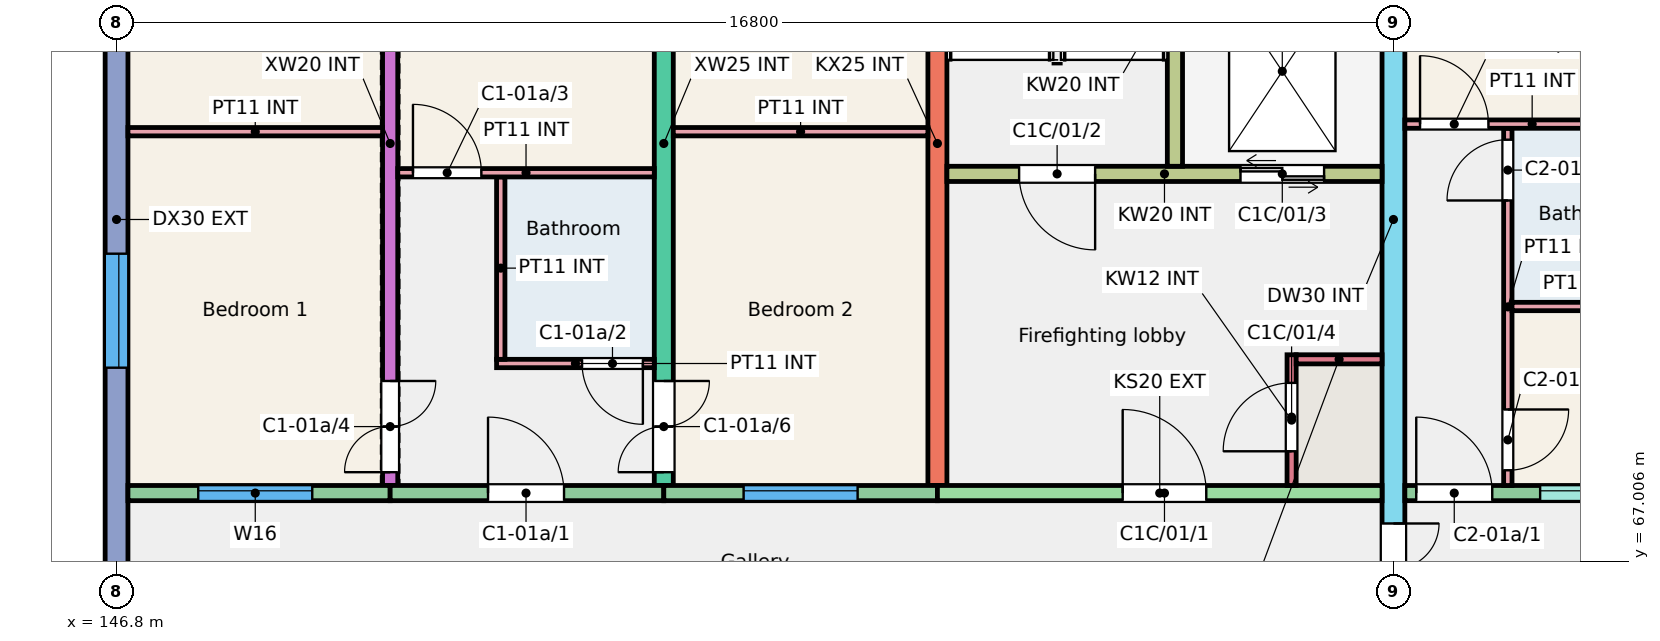
"""IFC4 building model, lengths in metres.
Left out: names, types, materials, properties, quantities, classifications, styles, units other than length and angle.
Written with IfcOpenShell. Run it as: python <this file> out.ifc"""

import sys

from ifc_helpers import new_model, si_unit, direction, frame, frame_2d, origin, place, context, subcontext, project, spatial, rectangle, extrude, element, fill, save


model = new_model("IFC4")
c1 = context("Model", 3, precision=1e-05, world=origin(), true_north=direction((0.0, 1.0)))
c2 = subcontext(c1, "Body", "Model", "MODEL_VIEW")
j1 = project(units=[si_unit("LENGTHUNIT", "METRE"), si_unit("PLANEANGLEUNIT", "RADIAN")], contexts=[c1])
p1 = place(None, origin())
s1 = spatial("IfcSite", under=j1, at=p1, CompositionType="ELEMENT")
p2 = place(p1, origin())
s2 = spatial("IfcBuilding", under=s1, at=p2, CompositionType="ELEMENT")
p3 = place(p2, frame((0.0, 0.0, 3.0)))
s3 = spatial("IfcBuildingStorey", under=s2, at=p3, CompositionType="ELEMENT", Elevation=3.0)
p4 = place(p3, frame((146.8, 66.0, 0.0), z_axis=(0.0, 0.0, 1.0), x_axis=(0.0, 1.0, 0.0)))
e1 = element("IfcWall", 1, at=p4, inside=s3, PredefinedType="SHEAR", context=c2, shape_type="SweptSolid", body=[
    extrude(rectangle(XDim=11.0, YDim=0.3, at=frame_2d((5.5, 0.0))), origin(), (0.0, 0.0, 1.0), 3.0),
])
p5 = place(p4, frame((3.55, 0.0, 0.9)))
e2 = element("IfcOpeningElement", 2, at=p5, cuts=e1, PredefinedType="OPENING", context=c2, shape_type="SweptSolid", body=[
    extrude(rectangle(XDim=1.5, YDim=1.5, at=frame_2d((0.75, 0.75))), frame((0.0, 0.16, 0.0), z_axis=(0.0, -1.0, 0.0), x_axis=(1.0, 0.0, 0.0)), (0.0, 0.0, 1.0), 0.32),
])
p6 = place(p4, frame((8.105, 0.0, 0.9)))
e3 = element("IfcOpeningElement", 3, at=p6, cuts=e1, PredefinedType="OPENING", context=c2, shape_type="SweptSolid", body=[
    extrude(rectangle(XDim=1.5, YDim=1.5, at=frame_2d((0.75, 0.75))), frame((0.0, 0.16, 0.0), z_axis=(0.0, -1.0, 0.0), x_axis=(1.0, 0.0, 0.0)), (0.0, 0.0, 1.0), 0.32),
])
p7 = place(p3, frame((150.4, 68.0, 0.0), z_axis=(0.0, 0.0, 1.0), x_axis=(0.0, 1.0, 0.0)))
e4 = element("IfcWall", 4, at=p7, inside=s3, PredefinedType="SHEAR", context=c2, shape_type="SweptSolid", body=[
    extrude(rectangle(XDim=9.0, YDim=0.2, at=frame_2d((4.5, 0.0))), origin(), (0.0, 0.0, 1.0), 3.0),
])
p8 = place(p7, frame((0.175, 0.0, 0.0)))
e5 = element("IfcOpeningElement", 5, at=p8, cuts=e4, PredefinedType="OPENING", context=c2, shape_type="SweptSolid", body=[
    extrude(rectangle(XDim=1.2, YDim=2.1, at=frame_2d((0.6, 1.05))), frame((0.0, 0.11, 0.0), z_axis=(0.0, -1.0, 0.0), x_axis=(1.0, 0.0, 0.0)), (0.0, 0.0, 1.0), 0.22),
])
p9 = place(p7, frame((6.4, 0.0, 0.0)))
e6 = element("IfcOpeningElement", 6, at=p9, cuts=e4, PredefinedType="OPENING", context=c2, shape_type="SweptSolid", body=[
    extrude(rectangle(XDim=1.2, YDim=2.1, at=frame_2d((0.6, 1.05))), frame((0.0, 0.11, 0.0), z_axis=(0.0, -1.0, 0.0), x_axis=(1.0, 0.0, 0.0)), (0.0, 0.0, 1.0), 0.22),
])
p10 = place(p3, frame((154.0, 68.0, 0.0), z_axis=(0.0, 0.0, 1.0), x_axis=(0.0, 1.0, 0.0)))
e7 = element("IfcWall", 7, at=p10, inside=s3, PredefinedType="SHEAR", context=c2, shape_type="SweptSolid", body=[
    extrude(rectangle(XDim=9.0, YDim=0.25, at=frame_2d((4.5, 0.0))), origin(), (0.0, 0.0, 1.0), 3.0),
])
p11 = place(p10, frame((0.175, 0.0, 0.0)))
e8 = element("IfcOpeningElement", 8, at=p11, cuts=e7, PredefinedType="OPENING", context=c2, shape_type="SweptSolid", body=[
    extrude(rectangle(XDim=1.2, YDim=2.1, at=frame_2d((0.6, 1.05))), frame((0.0, 0.135, 0.0), z_axis=(0.0, -1.0, 0.0), x_axis=(1.0, 0.0, 0.0)), (0.0, 0.0, 1.0), 0.27),
])
p12 = place(p10, frame((6.4, 0.0, 0.0)))
e9 = element("IfcOpeningElement", 9, at=p12, cuts=e7, PredefinedType="OPENING", context=c2, shape_type="SweptSolid", body=[
    extrude(rectangle(XDim=1.2, YDim=2.1, at=frame_2d((0.6, 1.05))), frame((0.0, 0.135, 0.0), z_axis=(0.0, -1.0, 0.0), x_axis=(1.0, 0.0, 0.0)), (0.0, 0.0, 1.0), 0.27),
])
p13 = place(p3, frame((157.6, 68.0, 0.0), z_axis=(0.0, 0.0, 1.0), x_axis=(0.0, 1.0, 0.0)))
e10 = element("IfcWall", 10, at=p13, inside=s3, PredefinedType="SHEAR", context=c2, shape_type="SweptSolid", body=[
    extrude(rectangle(XDim=9.0, YDim=0.25, at=frame_2d((4.5, 0.0))), origin(), (0.0, 0.0, 1.0), 3.0),
])
p14 = place(p3, frame((163.6, 66.0, 0.0), z_axis=(0.0, 0.0, 1.0), x_axis=(0.0, 1.0, 0.0)))
e11 = element("IfcWall", 11, at=p14, inside=s3, PredefinedType="SHEAR", context=c2, shape_type="SweptSolid", body=[
    extrude(rectangle(XDim=11.0, YDim=0.3, at=frame_2d((5.5, 0.0))), origin(), (0.0, 0.0, 1.0), 3.0),
])
p15 = place(p14, frame((0.3, 0.0, 0.0)))
e12 = element("IfcOpeningElement", 12, at=p15, cuts=e11, PredefinedType="OPENING", context=c2, shape_type="SweptSolid", body=[
    extrude(rectangle(XDim=1.2, YDim=2.1, at=frame_2d((0.6, 1.05))), frame((0.0, 0.16, 0.0), z_axis=(0.0, -1.0, 0.0), x_axis=(1.0, 0.0, 0.0)), (0.0, 0.0, 1.0), 0.32),
])
p16 = place(p3, frame((146.95, 67.9, 0.0), z_axis=(0.0, 0.0, 1.0), x_axis=(1.0, 0.0, 0.0)))
e13 = element("IfcWall", 13, at=p16, inside=s3, PredefinedType="SOLIDWALL", context=c2, shape_type="SweptSolid", body=[
    extrude(rectangle(XDim=3.45, YDim=0.2, at=frame_2d((1.725, 0.0))), origin(), (0.0, 0.0, 1.0), 3.0),
])
p17 = place(p16, frame((0.925, 0.0, 0.9)))
e14 = element("IfcOpeningElement", 14, at=p17, cuts=e13, PredefinedType="OPENING", context=c2, shape_type="SweptSolid", body=[
    extrude(rectangle(XDim=1.5, YDim=1.5, at=frame_2d((0.75, 0.75))), frame((0.0, 0.11, 0.0), z_axis=(0.0, -1.0, 0.0), x_axis=(1.0, 0.0, 0.0)), (0.0, 0.0, 1.0), 0.22),
])
p18 = place(p3, frame((150.4, 67.9, 0.0), z_axis=(0.0, 0.0, 1.0), x_axis=(1.0, 0.0, 0.0)))
e15 = element("IfcWall", 15, at=p18, inside=s3, PredefinedType="SOLIDWALL", context=c2, shape_type="SweptSolid", body=[
    extrude(rectangle(XDim=3.6, YDim=0.2, at=frame_2d((1.8, 0.0))), origin(), (0.0, 0.0, 1.0), 3.0),
])
p19 = place(p18, frame((1.288, 0.0, 0.0)))
e16 = element("IfcOpeningElement", 16, at=p19, cuts=e15, PredefinedType="OPENING", context=c2, shape_type="SweptSolid", body=[
    extrude(rectangle(XDim=1.0, YDim=2.1, at=frame_2d((0.5, 1.05))), frame((0.0, 0.11, 0.0), z_axis=(0.0, -1.0, 0.0), x_axis=(1.0, 0.0, 0.0)), (0.0, 0.0, 1.0), 0.22),
])
p20 = place(p3, frame((154.0, 67.9, 0.0), z_axis=(0.0, 0.0, 1.0), x_axis=(1.0, 0.0, 0.0)))
e17 = element("IfcWall", 17, at=p20, inside=s3, PredefinedType="SOLIDWALL", context=c2, shape_type="SweptSolid", body=[
    extrude(rectangle(XDim=3.6, YDim=0.2, at=frame_2d((1.8, 0.0))), origin(), (0.0, 0.0, 1.0), 3.0),
])
p21 = place(p20, frame((1.05, 0.0, 0.9)))
e18 = element("IfcOpeningElement", 18, at=p21, cuts=e17, PredefinedType="OPENING", context=c2, shape_type="SweptSolid", body=[
    extrude(rectangle(XDim=1.5, YDim=1.5, at=frame_2d((0.75, 0.75))), frame((0.0, 0.11, 0.0), z_axis=(0.0, -1.0, 0.0), x_axis=(1.0, 0.0, 0.0)), (0.0, 0.0, 1.0), 0.22),
])
p22 = place(p3, frame((157.6, 67.9, 0.0), z_axis=(0.0, 0.0, 1.0), x_axis=(1.0, 0.0, 0.0)))
e19 = element("IfcWall", 19, at=p22, inside=s3, PredefinedType="SHEAR", context=c2, shape_type="SweptSolid", body=[
    extrude(rectangle(XDim=5.85, YDim=0.2, at=frame_2d((2.925, 0.0))), origin(), (0.0, 0.0, 1.0), 3.0),
])
p23 = place(p22, frame((2.438, 0.0, 0.0)))
e20 = element("IfcOpeningElement", 20, at=p23, cuts=e19, PredefinedType="OPENING", context=c2, shape_type="SweptSolid", body=[
    extrude(rectangle(XDim=1.1, YDim=2.1, at=frame_2d((0.55, 1.05))), frame((0.0, 0.11, 0.0), z_axis=(0.0, -1.0, 0.0), x_axis=(1.0, 0.0, 0.0)), (0.0, 0.0, 1.0), 0.22),
])
p24 = place(p3, frame((157.725, 72.1, 0.0), z_axis=(0.0, 0.0, 1.0), x_axis=(1.0, 0.0, 0.0)))
e21 = element("IfcWall", 21, at=p24, inside=s3, PredefinedType="SHEAR", context=c2, shape_type="SweptSolid", body=[
    extrude(rectangle(XDim=5.725, YDim=0.2, at=frame_2d((2.862, 0.0))), origin(), (0.0, 0.0, 1.0), 3.0),
])
p25 = place(p24, frame((0.95, 0.0, 0.0)))
e22 = element("IfcOpeningElement", 22, at=p25, cuts=e21, PredefinedType="OPENING", context=c2, shape_type="SweptSolid", body=[
    extrude(rectangle(XDim=1.0, YDim=2.1, at=frame_2d((0.5, 1.05))), frame((0.0, 0.11, 0.0), z_axis=(0.0, -1.0, 0.0), x_axis=(1.0, 0.0, 0.0)), (0.0, 0.0, 1.0), 0.22),
])
p26 = place(p24, frame((3.863, 0.0, 0.0)))
e23 = element("IfcOpeningElement", 23, at=p26, cuts=e21, PredefinedType="OPENING", context=c2, shape_type="SweptSolid", body=[
    extrude(rectangle(XDim=1.1, YDim=2.1, at=frame_2d((0.55, 1.05))), frame((0.0, 0.11, 0.0), z_axis=(0.0, -1.0, 0.0), x_axis=(1.0, 0.0, 0.0)), (0.0, 0.0, 1.0), 0.22),
])
p27 = place(p3, frame((160.725, 72.2, 0.0), z_axis=(0.0, 0.0, 1.0), x_axis=(0.0, 1.0, 0.0)))
e24 = element("IfcWall", 24, at=p27, inside=s3, PredefinedType="SHEAR", context=c2, shape_type="SweptSolid", body=[
    extrude(rectangle(XDim=4.8, YDim=0.2, at=frame_2d((2.4, 0.0))), origin(), (0.0, 0.0, 1.0), 3.0),
])
p28 = place(p3, frame((162.26, 68.0, 0.0), z_axis=(0.0, 0.0, 1.0), x_axis=(0.0, 1.0, 0.0)))
e25 = element("IfcWall", 25, at=p28, inside=s3, PredefinedType="SHEAR", context=c2, shape_type="SweptSolid", body=[
    extrude(rectangle(XDim=1.72, YDim=0.12, at=frame_2d((0.86, 0.0))), origin(), (0.0, 0.0, 1.0), 3.0),
])
p29 = place(p28, frame((0.45, 0.0, 0.0)))
e26 = element("IfcOpeningElement", 26, at=p29, cuts=e25, PredefinedType="OPENING", context=c2, shape_type="SweptSolid", body=[
    extrude(rectangle(XDim=0.9, YDim=2.1, at=frame_2d((0.45, 1.05))), frame((0.0, 0.07, 0.0), z_axis=(0.0, -1.0, 0.0), x_axis=(1.0, 0.0, 0.0)), (0.0, 0.0, 1.0), 0.14),
])
p30 = place(p3, frame((162.32, 69.66, 0.0), z_axis=(0.0, 0.0, 1.0), x_axis=(1.0, 0.0, 0.0)))
e27 = element("IfcWall", 27, at=p30, inside=s3, PredefinedType="SHEAR", context=c2, shape_type="SweptSolid", body=[
    extrude(rectangle(XDim=1.13, YDim=0.12, at=frame_2d((0.565, 0.0))), origin(), (0.0, 0.0, 1.0), 3.0),
])
p31 = place(p3, frame((163.75, 67.9, 0.0), z_axis=(0.0, 0.0, 1.0), x_axis=(1.0, 0.0, 0.0)))
e28 = element("IfcWall", 28, at=p31, inside=s3, PredefinedType="SOLIDWALL", context=c2, shape_type="SweptSolid", body=[
    extrude(rectangle(XDim=3.45, YDim=0.2, at=frame_2d((1.725, 0.0))), origin(), (0.0, 0.0, 1.0), 3.0),
])
p32 = place(p31, frame((1.78, 0.0, 1.1)))
e29 = element("IfcOpeningElement", 29, at=p32, cuts=e28, PredefinedType="OPENING", context=c2, shape_type="SweptSolid", body=[
    extrude(rectangle(XDim=1.2, YDim=1.3, at=frame_2d((0.6, 0.65))), frame((0.0, 0.11, 0.0), z_axis=(0.0, -1.0, 0.0), x_axis=(1.0, 0.0, 0.0)), (0.0, 0.0, 1.0), 0.22),
])
p33 = place(p31, frame((0.15, 0.0, 0.0)))
e30 = element("IfcOpeningElement", 30, at=p33, cuts=e28, PredefinedType="OPENING", context=c2, shape_type="SweptSolid", body=[
    extrude(rectangle(XDim=1.0, YDim=2.1, at=frame_2d((0.5, 1.05))), frame((0.0, 0.11, 0.0), z_axis=(0.0, -1.0, 0.0), x_axis=(1.0, 0.0, 0.0)), (0.0, 0.0, 1.0), 0.22),
])
p34 = place(p3, frame((151.8, 69.605, 0.0), z_axis=(0.0, 0.0, 1.0), x_axis=(1.0, 0.0, 0.0)))
e31 = element("IfcWall", 31, at=p34, inside=s3, PredefinedType="PARTITIONING", context=c2, shape_type="SweptSolid", body=[
    extrude(rectangle(XDim=2.075, YDim=0.11, at=frame_2d((1.038, 0.0))), origin(), (0.0, 0.0, 1.0), 2.8),
])
p35 = place(p34, frame((1.125, 0.0, 0.0)))
e32 = element("IfcOpeningElement", 32, at=p35, cuts=e31, PredefinedType="OPENING", context=c2, shape_type="SweptSolid", body=[
    extrude(rectangle(XDim=0.8, YDim=2.1, at=frame_2d((0.4, 1.05))), frame((0.0, 0.065, 0.0), z_axis=(0.0, -1.0, 0.0), x_axis=(1.0, 0.0, 0.0)), (0.0, 0.0, 1.0), 0.13),
])
p36 = place(p3, frame((151.855, 69.66, 0.0), z_axis=(0.0, 0.0, 1.0), x_axis=(0.0, 1.0, 0.0)))
e33 = element("IfcWall", 33, at=p36, inside=s3, PredefinedType="PARTITIONING", context=c2, shape_type="SweptSolid", body=[
    extrude(rectangle(XDim=2.4, YDim=0.11, at=frame_2d((1.2, 0.0))), origin(), (0.0, 0.0, 1.0), 2.8),
])
p37 = place(p3, frame((150.5, 72.115, 0.0), z_axis=(0.0, 0.0, 1.0), x_axis=(1.0, 0.0, 0.0)))
e34 = element("IfcWall", 34, at=p37, inside=s3, PredefinedType="PARTITIONING", context=c2, shape_type="SweptSolid", body=[
    extrude(rectangle(XDim=3.375, YDim=0.11, at=frame_2d((1.688, 0.0))), origin(), (0.0, 0.0, 1.0), 2.8),
])
p38 = place(p37, frame((0.2, 0.0, 0.0)))
e35 = element("IfcOpeningElement", 35, at=p38, cuts=e34, PredefinedType="OPENING", context=c2, shape_type="SweptSolid", body=[
    extrude(rectangle(XDim=0.9, YDim=2.1, at=frame_2d((0.45, 1.05))), frame((0.0, 0.065, 0.0), z_axis=(0.0, -1.0, 0.0), x_axis=(1.0, 0.0, 0.0)), (0.0, 0.0, 1.0), 0.13),
])
for number, where, z_axis, x_axis in (
    (36, (146.95, 72.655, 0.0), (0.0, 0.0, 1.0), (1.0, 0.0, 0.0)),
    (37, (154.125, 72.655, 0.0), (0.0, 0.0, 1.0), (1.0, 0.0, 0.0)),
):
    element("IfcWall", number, at=place(p3, frame(where, z_axis=z_axis, x_axis=x_axis)), inside=s3, PredefinedType="PARTITIONING", context=c2, shape_type="SweptSolid", body=[
        extrude(rectangle(XDim=3.35, YDim=0.11, at=frame_2d((1.675, 0.0))), origin(), (0.0, 0.0, 1.0), 2.8),
    ])
p39 = place(p3, frame((165.105, 68.0, 0.0), z_axis=(0.0, 0.0, 1.0), x_axis=(0.0, 1.0, 0.0)))
e38 = element("IfcWall", 38, at=p39, inside=s3, PredefinedType="PARTITIONING", context=c2, shape_type="SweptSolid", body=[
    extrude(rectangle(XDim=4.7, YDim=0.11, at=frame_2d((2.35, 0.0))), origin(), (0.0, 0.0, 1.0), 2.8),
])
p40 = place(p39, frame((0.2, 0.0, 0.0)))
e39 = element("IfcOpeningElement", 39, at=p40, cuts=e38, PredefinedType="OPENING", context=c2, shape_type="SweptSolid", body=[
    extrude(rectangle(XDim=0.8, YDim=2.1, at=frame_2d((0.4, 1.05))), frame((0.0, 0.065, 0.0), z_axis=(0.0, -1.0, 0.0), x_axis=(1.0, 0.0, 0.0)), (0.0, 0.0, 1.0), 0.13),
])
p41 = place(p39, frame((3.75, 0.0, 0.0)))
e40 = element("IfcOpeningElement", 40, at=p41, cuts=e38, PredefinedType="OPENING", context=c2, shape_type="SweptSolid", body=[
    extrude(rectangle(XDim=0.8, YDim=2.1, at=frame_2d((0.4, 1.05))), frame((0.0, 0.065, 0.0), z_axis=(0.0, -1.0, 0.0), x_axis=(1.0, 0.0, 0.0)), (0.0, 0.0, 1.0), 0.13),
])
p42 = place(p3, frame((165.16, 70.355, 0.0), z_axis=(0.0, 0.0, 1.0), x_axis=(1.0, 0.0, 0.0)))
e41 = element("IfcWall", 41, at=p42, inside=s3, PredefinedType="PARTITIONING", context=c2, shape_type="SweptSolid", body=[
    extrude(rectangle(XDim=1.94, YDim=0.11, at=frame_2d((0.97, 0.0))), origin(), (0.0, 0.0, 1.0), 2.8),
])
p43 = place(p3, frame((163.75, 72.755, 0.0), z_axis=(0.0, 0.0, 1.0), x_axis=(1.0, 0.0, 0.0)))
e42 = element("IfcWall", 42, at=p43, inside=s3, PredefinedType="PARTITIONING", context=c2, shape_type="SweptSolid", body=[
    extrude(rectangle(XDim=3.35, YDim=0.11, at=frame_2d((1.675, 0.0))), origin(), (0.0, 0.0, 1.0), 2.8),
])
p44 = place(p43, frame((0.2, 0.0, 0.0)))
e43 = element("IfcOpeningElement", 43, at=p44, cuts=e42, PredefinedType="OPENING", context=c2, shape_type="SweptSolid", body=[
    extrude(rectangle(XDim=0.9, YDim=2.1, at=frame_2d((0.45, 1.05))), frame((0.0, 0.065, 0.0), z_axis=(0.0, -1.0, 0.0), x_axis=(1.0, 0.0, 0.0)), (0.0, 0.0, 1.0), 0.13),
])
p45 = place(p17, origin())
e44 = element("IfcWindow", 44, at=p45, inside=s3, PartitioningType="SINGLE_PANEL", PredefinedType="WINDOW", context=c2, shape_type="SweptSolid", body=[
    extrude(rectangle(XDim=1.5, YDim=1.5, at=frame_2d((0.75, 0.75))), frame((0.0, 0.06, 0.0), z_axis=(0.0, -1.0, 0.0), x_axis=(1.0, 0.0, 0.0)), (0.0, 0.0, 1.0), 0.06),
])
fill(e14, e44)
p46 = place(p21, origin())
e45 = element("IfcWindow", 45, at=p46, inside=s3, PartitioningType="SINGLE_PANEL", PredefinedType="WINDOW", context=c2, shape_type="SweptSolid", body=[
    extrude(rectangle(XDim=1.5, YDim=1.5, at=frame_2d((0.75, 0.75))), frame((0.0, 0.06, 0.0), z_axis=(0.0, -1.0, 0.0), x_axis=(1.0, 0.0, 0.0)), (0.0, 0.0, 1.0), 0.06),
])
fill(e18, e45)
p47 = place(p5, origin())
e46 = element("IfcWindow", 46, at=p47, inside=s3, PartitioningType="SINGLE_PANEL", PredefinedType="WINDOW", context=c2, shape_type="SweptSolid", body=[
    extrude(rectangle(XDim=1.5, YDim=1.5, at=frame_2d((0.75, 0.75))), frame((0.0, 0.0, 0.0), z_axis=(0.0, -1.0, 0.0), x_axis=(1.0, 0.0, 0.0)), (0.0, 0.0, 1.0), 0.06),
])
fill(e2, e46)
p48 = place(p32, origin())
e47 = element("IfcWindow", 47, at=p48, inside=s3, PartitioningType="SINGLE_PANEL", PredefinedType="WINDOW", context=c2, shape_type="SweptSolid", body=[
    extrude(rectangle(XDim=1.2, YDim=1.3, at=frame_2d((0.6, 0.65))), frame((0.0, 0.06, 0.0), z_axis=(0.0, -1.0, 0.0), x_axis=(1.0, 0.0, 0.0)), (0.0, 0.0, 1.0), 0.06),
])
fill(e29, e47)
p49 = place(p19, origin())
e48 = element("IfcDoor", 48, at=p49, inside=s3, OperationType="SINGLE_SWING_LEFT", PredefinedType="DOOR", context=c2, shape_type="SweptSolid", body=[
    extrude(rectangle(XDim=1.0, YDim=2.1, at=frame_2d((0.5, 1.05))), frame((0.0, 0.025, 0.0), z_axis=(0.0, -1.0, 0.0), x_axis=(1.0, 0.0, 0.0)), (0.0, 0.0, 1.0), 0.05),
])
fill(e16, e48)
p50 = place(p35, origin())
e49 = element("IfcDoor", 49, at=p50, inside=s3, OperationType="SINGLE_SWING_RIGHT", PredefinedType="DOOR", context=c2, shape_type="SweptSolid", body=[
    extrude(rectangle(XDim=0.8, YDim=2.1, at=frame_2d((0.4, 1.05))), frame((0.0, 0.025, 0.0), z_axis=(0.0, -1.0, 0.0), x_axis=(1.0, 0.0, 0.0)), (0.0, 0.0, 1.0), 0.05),
])
fill(e32, e49)
p51 = place(p38, origin())
e50 = element("IfcDoor", 50, at=p51, inside=s3, OperationType="SINGLE_SWING_LEFT", PredefinedType="DOOR", context=c2, shape_type="SweptSolid", body=[
    extrude(rectangle(XDim=0.9, YDim=2.1, at=frame_2d((0.45, 1.05))), frame((0.0, 0.025, 0.0), z_axis=(0.0, -1.0, 0.0), x_axis=(1.0, 0.0, 0.0)), (0.0, 0.0, 1.0), 0.05),
])
fill(e35, e50)
p52 = place(p8, origin())
e51 = element("IfcDoor", 51, at=p52, inside=s3, OperationType="DOUBLE_DOOR_SINGLE_SWING", PredefinedType="DOOR", context=c2, shape_type="SweptSolid", body=[
    extrude(rectangle(XDim=1.2, YDim=2.1, at=frame_2d((0.6, 1.05))), frame((0.0, 0.025, 0.0), z_axis=(0.0, -1.0, 0.0), x_axis=(1.0, 0.0, 0.0)), (0.0, 0.0, 1.0), 0.05),
])
fill(e5, e51)
p53 = place(p11, origin())
e52 = element("IfcDoor", 52, at=p53, inside=s3, OperationType="DOUBLE_DOOR_SINGLE_SWING", PredefinedType="DOOR", context=c2, shape_type="SweptSolid", body=[
    extrude(rectangle(XDim=1.2, YDim=2.1, at=frame_2d((0.6, 1.05))), frame((0.0, 0.025, 0.0), z_axis=(0.0, -1.0, 0.0), x_axis=(1.0, 0.0, 0.0)), (0.0, 0.0, 1.0), 0.05),
])
fill(e8, e52)
p54 = place(p33, origin())
e53 = element("IfcDoor", 53, at=p54, inside=s3, OperationType="SINGLE_SWING_LEFT", PredefinedType="DOOR", context=c2, shape_type="SweptSolid", body=[
    extrude(rectangle(XDim=1.0, YDim=2.1, at=frame_2d((0.5, 1.05))), frame((0.0, 0.025, 0.0), z_axis=(0.0, -1.0, 0.0), x_axis=(1.0, 0.0, 0.0)), (0.0, 0.0, 1.0), 0.05),
])
fill(e30, e53)
p55 = place(p40, origin())
e54 = element("IfcDoor", 54, at=p55, inside=s3, OperationType="SINGLE_SWING_RIGHT", PredefinedType="DOOR", context=c2, shape_type="SweptSolid", body=[
    extrude(rectangle(XDim=0.8, YDim=2.1, at=frame_2d((0.4, 1.05))), frame((0.0, 0.025, 0.0), z_axis=(0.0, -1.0, 0.0), x_axis=(1.0, 0.0, 0.0)), (0.0, 0.0, 1.0), 0.05),
])
fill(e39, e54)
p56 = place(p41, origin())
e55 = element("IfcDoor", 55, at=p56, inside=s3, OperationType="SINGLE_SWING_LEFT", PredefinedType="DOOR", context=c2, shape_type="SweptSolid", body=[
    extrude(rectangle(XDim=0.8, YDim=2.1, at=frame_2d((0.4, 1.05))), frame((0.0, 0.025, 0.0), z_axis=(0.0, -1.0, 0.0), x_axis=(1.0, 0.0, 0.0)), (0.0, 0.0, 1.0), 0.05),
])
fill(e40, e55)
p57 = place(p44, origin())
e56 = element("IfcDoor", 56, at=p57, inside=s3, OperationType="SINGLE_SWING_LEFT", PredefinedType="DOOR", context=c2, shape_type="SweptSolid", body=[
    extrude(rectangle(XDim=0.9, YDim=2.1, at=frame_2d((0.45, 1.05))), frame((0.0, 0.025, 0.0), z_axis=(0.0, -1.0, 0.0), x_axis=(1.0, 0.0, 0.0)), (0.0, 0.0, 1.0), 0.05),
])
fill(e43, e56)
p58 = place(p23, origin())
e57 = element("IfcDoor", 57, at=p58, inside=s3, OperationType="SINGLE_SWING_LEFT", PredefinedType="DOOR", context=c2, shape_type="SweptSolid", body=[
    extrude(rectangle(XDim=1.1, YDim=2.1, at=frame_2d((0.55, 1.05))), frame((0.0, 0.025, 0.0), z_axis=(0.0, -1.0, 0.0), x_axis=(1.0, 0.0, 0.0)), (0.0, 0.0, 1.0), 0.05),
])
fill(e20, e57)
p59 = place(p25, origin())
e58 = element("IfcDoor", 58, at=p59, inside=s3, OperationType="SINGLE_SWING_RIGHT", PredefinedType="DOOR", context=c2, shape_type="SweptSolid", body=[
    extrude(rectangle(XDim=1.0, YDim=2.1, at=frame_2d((0.5, 1.05))), frame((0.0, 0.025, 0.0), z_axis=(0.0, -1.0, 0.0), x_axis=(1.0, 0.0, 0.0)), (0.0, 0.0, 1.0), 0.05),
])
fill(e22, e58)
p60 = place(p26, origin())
e59 = element("IfcDoor", 59, at=p60, inside=s3, OperationType="DOUBLE_DOOR_SLIDING", PredefinedType="DOOR", context=c2, shape_type="SweptSolid", body=[
    extrude(rectangle(XDim=1.1, YDim=2.1, at=frame_2d((0.55, 1.05))), frame((0.0, 0.025, 0.0), z_axis=(0.0, -1.0, 0.0), x_axis=(1.0, 0.0, 0.0)), (0.0, 0.0, 1.0), 0.05),
])
fill(e23, e59)
p61 = place(p29, origin())
e60 = element("IfcDoor", 60, at=p61, inside=s3, OperationType="SINGLE_SWING_LEFT", PredefinedType="DOOR", context=c2, shape_type="SweptSolid", body=[
    extrude(rectangle(XDim=0.9, YDim=2.1, at=frame_2d((0.45, 1.05))), frame((0.0, 0.025, 0.0), z_axis=(0.0, -1.0, 0.0), x_axis=(1.0, 0.0, 0.0)), (0.0, 0.0, 1.0), 0.05),
])
fill(e26, e60)
p62 = place(p15, origin())
e61 = element("IfcDoor", 61, at=p62, inside=s3, OperationType="DOUBLE_DOOR_SINGLE_SWING", PredefinedType="DOOR", context=c2, shape_type="SweptSolid", body=[
    extrude(rectangle(XDim=1.2, YDim=2.1, at=frame_2d((0.6, 1.05))), frame((0.0, 0.025, 0.0), z_axis=(0.0, -1.0, 0.0), x_axis=(1.0, 0.0, 0.0)), (0.0, 0.0, 1.0), 0.05),
])
fill(e12, e61)
save(model, sys.argv[1])
